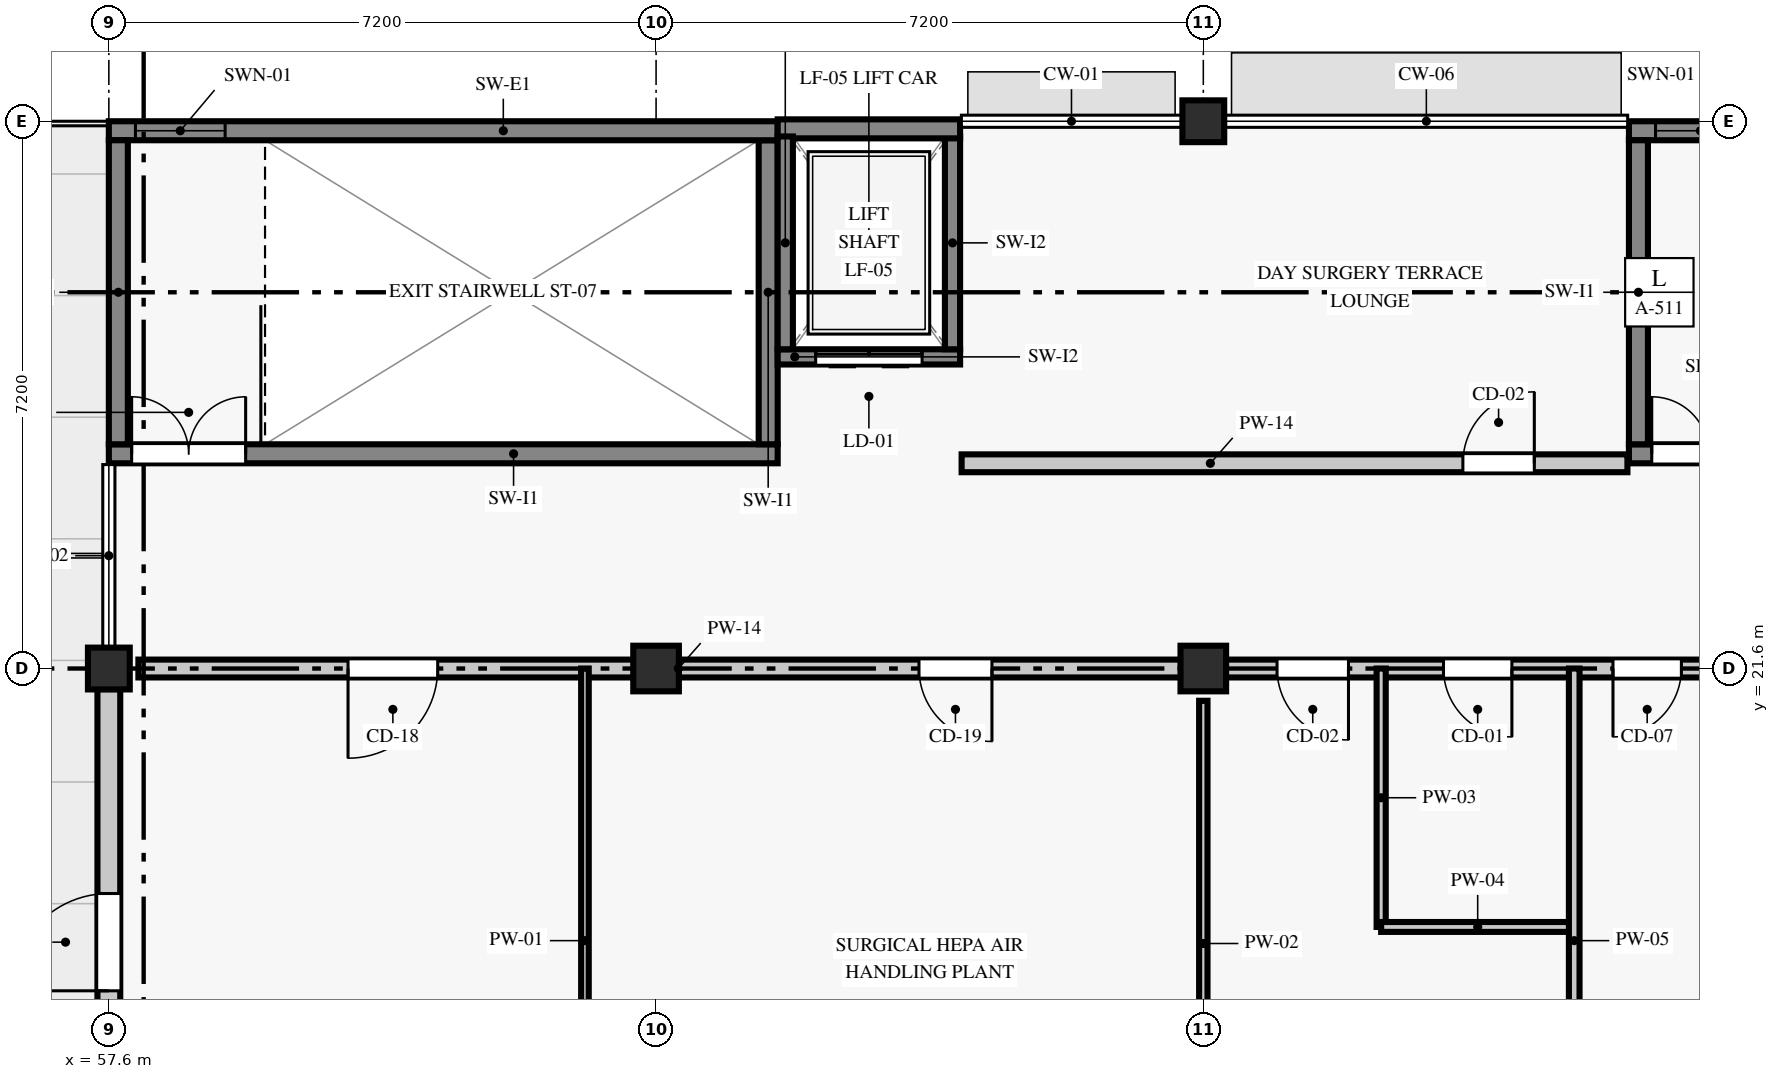
"""IFC4 building model, lengths in metres.
Left out: names, types, materials, properties, quantities, classifications, styles, units other than length and angle.
Written with IfcOpenShell. Run it as: python <this file> out.ifc"""

import sys

from ifc_helpers import new_model, si_unit, direction, frame, frame_2d, origin, origin_2d, place, context, subcontext, project, spatial, rectangle, extrude, element, fill, save


model = new_model("IFC4")
c1 = context("Model", 3, precision=1e-05, world=origin(), true_north=direction((0.0, 1.0)))
c2 = subcontext(c1, "Body", "Model", "MODEL_VIEW")
j1 = project(units=[si_unit("LENGTHUNIT", "METRE"), si_unit("PLANEANGLEUNIT", "RADIAN")], contexts=[c1])
p1 = place(None, origin())
s1 = spatial("IfcSite", under=j1, at=p1, CompositionType="ELEMENT")
p2 = place(p1, origin())
s2 = spatial("IfcBuilding", under=s1, at=p2, CompositionType="ELEMENT")
p3 = place(p2, frame((0.0, 0.0, 13.8)))
s3 = spatial("IfcBuildingStorey", under=s2, at=p3, CompositionType="ELEMENT", Elevation=13.8)
p4 = place(p3, frame((57.6, 21.6, 0.0), z_axis=(0.0, 0.0, 1.0), x_axis=(1.0, 0.0, 0.0)))
e1 = element("IfcColumn", 1, at=p4, inside=s3, PredefinedType="COLUMN", context=c2, shape_type="SweptSolid", body=[
    extrude(rectangle(XDim=0.55, YDim=0.55, at=origin_2d()), origin(), (0.0, 0.0, 1.0), 4.2),
])
for number, where, z_axis, x_axis in (
    (2, (64.8, 21.6, 0.0), (0.0, 0.0, 1.0), (1.0, 0.0, 0.0)),
    (3, (72.0, 21.6, 0.0), (0.0, 0.0, 1.0), (1.0, 0.0, 0.0)),
):
    element("IfcColumn", number, at=place(p3, frame(where, z_axis=z_axis, x_axis=x_axis)), inside=s3, PredefinedType="COLUMN", context=c2, shape_type="SweptSolid", body=[
        extrude(rectangle(XDim=0.6, YDim=0.6, at=origin_2d()), origin(), (0.0, 0.0, 1.0), 4.2),
    ])
p5 = place(p3, frame((72.0, 28.8, 0.0), z_axis=(0.0, 0.0, 1.0), x_axis=(1.0, 0.0, 0.0)))
e4 = element("IfcColumn", 4, at=p5, inside=s3, PredefinedType="COLUMN", context=c2, shape_type="SweptSolid", body=[
    extrude(rectangle(XDim=0.55, YDim=0.55, at=origin_2d()), origin(), (0.0, 0.0, 1.0), 4.2),
])
p6 = place(p3, frame((57.6, 21.329, 0.0), z_axis=(0.0, 0.0, 1.0), x_axis=(0.0, -1.0, 0.0)))
e5 = element("IfcWall", 5, at=p6, inside=s3, PredefinedType="STANDARD", context=c2, shape_type="SweptSolid", body=[
    extrude(rectangle(XDim=6.658, YDim=0.3, at=frame_2d((3.329, 0.0))), origin(), (0.0, 0.0, 1.0), 3.55),
])
p7 = place(p6, frame((2.689, 0.0, 0.0)))
e6 = element("IfcOpeningElement", 6, at=p7, cuts=e5, PredefinedType="OPENING", context=c2, shape_type="SweptSolid", body=[
    extrude(rectangle(XDim=1.28, YDim=2.15, at=frame_2d((0.64, 1.075))), frame((0.0, 0.16, 0.0), z_axis=(0.0, -1.0, 0.0), x_axis=(1.0, 0.0, 0.0)), (0.0, 0.0, 1.0), 0.32),
])
p8 = place(p3, frame((57.6, 24.425, 0.0), z_axis=(0.0, 0.0, 1.0), x_axis=(1.0, 0.0, 0.0)))
e7 = element("IfcWall", 7, at=p8, inside=s3, PredefinedType="SHEAR", context=c2, shape_type="SweptSolid", body=[
    extrude(rectangle(XDim=8.8, YDim=0.25, at=frame_2d((4.4, 0.0))), origin(), (0.0, 0.0, 1.0), 4.2),
])
p9 = place(p8, frame((0.3, 0.0, 0.0)))
e8 = element("IfcOpeningElement", 8, at=p9, cuts=e7, PredefinedType="OPENING", context=c2, shape_type="SweptSolid", body=[
    extrude(rectangle(XDim=1.5, YDim=2.15, at=frame_2d((0.75, 1.075))), frame((0.0, 0.135, 0.0), z_axis=(0.0, -1.0, 0.0), x_axis=(1.0, 0.0, 0.0)), (0.0, 0.0, 1.0), 0.27),
])
p10 = place(p3, frame((66.275, 24.55, 0.0), z_axis=(0.0, 0.0, 1.0), x_axis=(0.0, 1.0, 0.0)))
e9 = element("IfcWall", 9, at=p10, inside=s3, PredefinedType="SHEAR", context=c2, shape_type="SweptSolid", body=[
    extrude(rectangle(XDim=4.0, YDim=0.25, at=frame_2d((2.0, 0.0))), origin(), (0.0, 0.0, 1.0), 4.2),
])
p11 = place(p3, frame((66.4, 28.675, 0.0), z_axis=(0.0, 0.0, 1.0), x_axis=(-1.0, 0.0, 0.0)))
e10 = element("IfcWall", 10, at=p11, inside=s3, PredefinedType="SHEAR", context=c2, shape_type="SweptSolid", body=[
    extrude(rectangle(XDim=8.8, YDim=0.25, at=frame_2d((4.4, 0.0))), origin(), (0.0, 0.0, 1.0), 4.2),
])
p12 = place(p11, frame((7.27, 0.0, 0.92)))
e11 = element("IfcOpeningElement", 11, at=p12, cuts=e10, PredefinedType="OPENING", context=c2, shape_type="SweptSolid", body=[
    extrude(rectangle(XDim=1.18, YDim=1.48, at=frame_2d((0.59, 0.74))), frame((0.0, 0.135, 0.0), z_axis=(0.0, -1.0, 0.0), x_axis=(1.0, 0.0, 0.0)), (0.0, 0.0, 1.0), 0.27),
])
p13 = place(p3, frame((57.725, 28.55, 0.0), z_axis=(0.0, 0.0, 1.0), x_axis=(0.0, -1.0, 0.0)))
e12 = element("IfcWall", 12, at=p13, inside=s3, PredefinedType="SHEAR", context=c2, shape_type="SweptSolid", body=[
    extrude(rectangle(XDim=4.0, YDim=0.25, at=frame_2d((2.0, 0.0))), origin(), (0.0, 0.0, 1.0), 4.2),
])
p14 = place(p3, frame((77.6, 24.425, 0.0), z_axis=(0.0, 0.0, 1.0), x_axis=(1.0, 0.0, 0.0)))
e13 = element("IfcWall", 13, at=p14, inside=s3, PredefinedType="SHEAR", context=c2, shape_type="SweptSolid", body=[
    extrude(rectangle(XDim=8.8, YDim=0.25, at=frame_2d((4.4, 0.0))), origin(), (0.0, 0.0, 1.0), 4.2),
])
p15 = place(p14, frame((0.3, 0.0, 0.0)))
e14 = element("IfcOpeningElement", 14, at=p15, cuts=e13, PredefinedType="OPENING", context=c2, shape_type="SweptSolid", body=[
    extrude(rectangle(XDim=1.5, YDim=2.15, at=frame_2d((0.75, 1.075))), frame((0.0, 0.135, 0.0), z_axis=(0.0, -1.0, 0.0), x_axis=(1.0, 0.0, 0.0)), (0.0, 0.0, 1.0), 0.27),
])
p16 = place(p3, frame((86.4, 28.675, 0.0), z_axis=(0.0, 0.0, 1.0), x_axis=(-1.0, 0.0, 0.0)))
e15 = element("IfcWall", 15, at=p16, inside=s3, PredefinedType="SHEAR", context=c2, shape_type="SweptSolid", body=[
    extrude(rectangle(XDim=8.8, YDim=0.25, at=frame_2d((4.4, 0.0))), origin(), (0.0, 0.0, 1.0), 4.2),
])
p17 = place(p16, frame((7.27, 0.0, 0.92)))
e16 = element("IfcOpeningElement", 16, at=p17, cuts=e15, PredefinedType="OPENING", context=c2, shape_type="SweptSolid", body=[
    extrude(rectangle(XDim=1.18, YDim=1.48, at=frame_2d((0.59, 0.74))), frame((0.0, 0.135, 0.0), z_axis=(0.0, -1.0, 0.0), x_axis=(1.0, 0.0, 0.0)), (0.0, 0.0, 1.0), 0.27),
])
p18 = place(p3, frame((77.725, 28.55, 0.0), z_axis=(0.0, 0.0, 1.0), x_axis=(0.0, -1.0, 0.0)))
e17 = element("IfcWall", 17, at=p18, inside=s3, PredefinedType="SHEAR", context=c2, shape_type="SweptSolid", body=[
    extrude(rectangle(XDim=4.0, YDim=0.25, at=frame_2d((2.0, 0.0))), origin(), (0.0, 0.0, 1.0), 4.2),
])
p19 = place(p3, frame((66.4, 25.7, 0.0), z_axis=(0.0, 0.0, 1.0), x_axis=(1.0, 0.0, 0.0)))
e18 = element("IfcWall", 18, at=p19, inside=s3, PredefinedType="SHEAR", context=c2, shape_type="SweptSolid", body=[
    extrude(rectangle(XDim=2.4, YDim=0.2, at=frame_2d((1.2, 0.0))), origin(), (0.0, 0.0, 1.0), 4.2),
])
p20 = place(p19, frame((0.5, 0.0, 0.0)))
e19 = element("IfcOpeningElement", 19, at=p20, cuts=e18, PredefinedType="OPENING", context=c2, shape_type="SweptSolid", body=[
    extrude(rectangle(XDim=1.4, YDim=2.15, at=frame_2d((0.7, 1.075))), frame((0.0, 0.11, 0.0), z_axis=(0.0, -1.0, 0.0), x_axis=(1.0, 0.0, 0.0)), (0.0, 0.0, 1.0), 0.22),
])
p21 = place(p3, frame((68.7, 25.8, 0.0), z_axis=(0.0, 0.0, 1.0), x_axis=(0.0, 1.0, 0.0)))
e20 = element("IfcWall", 20, at=p21, inside=s3, PredefinedType="SHEAR", context=c2, shape_type="SweptSolid", body=[
    extrude(rectangle(XDim=2.8, YDim=0.2, at=frame_2d((1.4, 0.0))), origin(), (0.0, 0.0, 1.0), 4.2),
])
p22 = place(p3, frame((68.8, 28.7, 0.0), z_axis=(0.0, 0.0, 1.0), x_axis=(-1.0, 0.0, 0.0)))
e21 = element("IfcWall", 21, at=p22, inside=s3, PredefinedType="SHEAR", context=c2, shape_type="SweptSolid", body=[
    extrude(rectangle(XDim=2.4, YDim=0.25, at=frame_2d((1.2, 0.0))), origin(), (0.0, 0.0, 1.0), 4.2),
])
p23 = place(p3, frame((66.5, 28.6, 0.0), z_axis=(0.0, 0.0, 1.0), x_axis=(0.0, -1.0, 0.0)))
e22 = element("IfcWall", 22, at=p23, inside=s3, PredefinedType="SHEAR", context=c2, shape_type="SweptSolid", body=[
    extrude(rectangle(XDim=2.8, YDim=0.2, at=frame_2d((1.4, 0.0))), origin(), (0.0, 0.0, 1.0), 4.2),
])
p24 = place(p3, frame((57.989, 21.6, 0.0), z_axis=(0.0, 0.0, 1.0), x_axis=(1.0, 0.0, 0.0)))
e23 = element("IfcWall", 23, at=p24, inside=s3, PredefinedType="PARTITIONING", context=c2, shape_type="SweptSolid", body=[
    extrude(rectangle(XDim=28.022, YDim=0.235, at=frame_2d((14.011, 0.0))), origin(), (0.0, 0.0, 1.0), 3.35),
])
p25 = place(p24, frame((2.758, 0.0, 0.0)))
e24 = element("IfcOpeningElement", 24, at=p25, cuts=e23, PredefinedType="OPENING", context=c2, shape_type="SweptSolid", body=[
    extrude(rectangle(XDim=1.18, YDim=2.18, at=frame_2d((0.59, 1.09))), frame((0.0, 0.127, 0.0), z_axis=(0.0, -1.0, 0.0), x_axis=(1.0, 0.0, 0.0)), (0.0, 0.0, 1.0), 0.255),
])
p26 = place(p24, frame((10.27, 0.0, 0.0)))
e25 = element("IfcOpeningElement", 25, at=p26, cuts=e23, PredefinedType="OPENING", context=c2, shape_type="SweptSolid", body=[
    extrude(rectangle(XDim=0.96, YDim=2.23, at=frame_2d((0.48, 1.115))), frame((0.0, 0.127, 0.0), z_axis=(0.0, -1.0, 0.0), x_axis=(1.0, 0.0, 0.0)), (0.0, 0.0, 1.0), 0.255),
])
p27 = place(p24, frame((14.981, 0.0, 0.0)))
e26 = element("IfcOpeningElement", 26, at=p27, cuts=e23, PredefinedType="OPENING", context=c2, shape_type="SweptSolid", body=[
    extrude(rectangle(XDim=0.94, YDim=2.08, at=frame_2d((0.47, 1.04))), frame((0.0, 0.127, 0.0), z_axis=(0.0, -1.0, 0.0), x_axis=(1.0, 0.0, 0.0)), (0.0, 0.0, 1.0), 0.255),
])
p28 = place(p24, frame((17.171, 0.0, 0.0)))
e27 = element("IfcOpeningElement", 27, at=p28, cuts=e23, PredefinedType="OPENING", context=c2, shape_type="SweptSolid", body=[
    extrude(rectangle(XDim=0.9, YDim=2.08, at=frame_2d((0.45, 1.04))), frame((0.0, 0.127, 0.0), z_axis=(0.0, -1.0, 0.0), x_axis=(1.0, 0.0, 0.0)), (0.0, 0.0, 1.0), 0.255),
])
p29 = place(p24, frame((19.401, 0.0, 0.0)))
e28 = element("IfcOpeningElement", 28, at=p29, cuts=e23, PredefinedType="OPENING", context=c2, shape_type="SweptSolid", body=[
    extrude(rectangle(XDim=0.9, YDim=2.13, at=frame_2d((0.45, 1.065))), frame((0.0, 0.127, 0.0), z_axis=(0.0, -1.0, 0.0), x_axis=(1.0, 0.0, 0.0)), (0.0, 0.0, 1.0), 0.255),
])
p30 = place(p24, frame((24.318, 0.0, 0.0)))
e29 = element("IfcOpeningElement", 29, at=p30, cuts=e23, PredefinedType="OPENING", context=c2, shape_type="SweptSolid", body=[
    extrude(rectangle(XDim=0.9, YDim=2.08, at=frame_2d((0.45, 1.04))), frame((0.0, 0.127, 0.0), z_axis=(0.0, -1.0, 0.0), x_axis=(1.0, 0.0, 0.0)), (0.0, 0.0, 1.0), 0.255),
])
p31 = place(p3, frame((63.864, 14.44, 0.0), z_axis=(0.0, 0.0, 1.0), x_axis=(0.0, 1.0, 0.0)))
e30 = element("IfcWall", 30, at=p31, inside=s3, PredefinedType="PARTITIONING", context=c2, shape_type="SweptSolid", body=[
    extrude(rectangle(XDim=7.16, YDim=0.1, at=frame_2d((3.58, 0.0))), origin(), (0.0, 0.0, 1.0), 3.35),
])
p32 = place(p3, frame((72.0, 14.789, 0.0), z_axis=(0.0, 0.0, 1.0), x_axis=(0.0, 1.0, 0.0)))
e31 = element("IfcWall", 31, at=p32, inside=s3, PredefinedType="PARTITIONING", context=c2, shape_type="SweptSolid", body=[
    extrude(rectangle(XDim=6.387, YDim=0.11, at=frame_2d((3.193, 0.0))), origin(), (0.0, 0.0, 1.0), 3.6),
])
p33 = place(p3, frame((74.34, 18.2, 0.0), z_axis=(0.0, 0.0, 1.0), x_axis=(0.0, 1.0, 0.0)))
e32 = element("IfcWall", 32, at=p33, inside=s3, PredefinedType="PARTITIONING", context=c2, shape_type="SweptSolid", body=[
    extrude(rectangle(XDim=3.4, YDim=0.12, at=frame_2d((1.7, 0.0))), origin(), (0.0, 0.0, 1.0), 3.35),
])
p34 = place(p3, frame((74.34, 18.2, 0.0), z_axis=(0.0, 0.0, 1.0), x_axis=(1.0, 0.0, 0.0)))
e33 = element("IfcWall", 33, at=p34, inside=s3, PredefinedType="PARTITIONING", context=c2, shape_type="SweptSolid", body=[
    extrude(rectangle(XDim=2.54, YDim=0.13, at=frame_2d((1.27, 0.0))), origin(), (0.0, 0.0, 1.0), 3.7),
])
p35 = place(p3, frame((76.88, 14.44, 0.0), z_axis=(0.0, 0.0, 1.0), x_axis=(0.0, 1.0, 0.0)))
e34 = element("IfcWall", 34, at=p35, inside=s3, PredefinedType="PARTITIONING", context=c2, shape_type="SweptSolid", body=[
    extrude(rectangle(XDim=7.16, YDim=0.14, at=frame_2d((3.58, 0.0))), origin(), (0.0, 0.0, 1.0), 3.35),
])
p36 = place(p3, frame((68.82, 24.3, 0.0), z_axis=(0.0, 0.0, 1.0), x_axis=(1.0, 0.0, 0.0)))
e35 = element("IfcWall", 35, at=p36, inside=s3, PredefinedType="PARTITIONING", context=c2, shape_type="SweptSolid", body=[
    extrude(rectangle(XDim=8.76, YDim=0.235, at=frame_2d((4.38, 0.0))), origin(), (0.0, 0.0, 1.0), 3.6),
])
p37 = place(p36, frame((6.595, 0.0, 0.0)))
e36 = element("IfcOpeningElement", 36, at=p37, cuts=e35, PredefinedType="OPENING", context=c2, shape_type="SweptSolid", body=[
    extrude(rectangle(XDim=0.94, YDim=2.08, at=frame_2d((0.47, 1.04))), frame((0.0, 0.127, 0.0), z_axis=(0.0, -1.0, 0.0), x_axis=(1.0, 0.0, 0.0)), (0.0, 0.0, 1.0), 0.255),
])
p38 = place(p7, frame((1.28, 0.0, 0.0), z_axis=(0.0, 0.0, 1.0), x_axis=(-1.0, 0.0, 0.0)))
e37 = element("IfcDoor", 37, at=p38, inside=s3, OperationType="SINGLE_SWING_LEFT", PredefinedType="DOOR", context=c2, shape_type="SweptSolid", body=[
    extrude(rectangle(XDim=1.28, YDim=2.15, at=frame_2d((0.64, 1.075))), frame((0.0, 0.025, 0.0), z_axis=(0.0, -1.0, 0.0), x_axis=(1.0, 0.0, 0.0)), (0.0, 0.0, 1.0), 0.05),
])
fill(e6, e37)
p39 = place(p9, origin())
e38 = element("IfcDoor", 38, at=p39, inside=s3, OperationType="DOUBLE_DOOR_SINGLE_SWING", PredefinedType="DOOR", context=c2, shape_type="SweptSolid", body=[
    extrude(rectangle(XDim=1.5, YDim=2.15, at=frame_2d((0.75, 1.075))), frame((0.0, 0.025, 0.0), z_axis=(0.0, -1.0, 0.0), x_axis=(1.0, 0.0, 0.0)), (0.0, 0.0, 1.0), 0.05),
])
fill(e8, e38)
p40 = place(p12, origin())
e39 = element("IfcWindow", 39, at=p40, inside=s3, PartitioningType="SINGLE_PANEL", PredefinedType="WINDOW", context=c2, shape_type="SweptSolid", body=[
    extrude(rectangle(XDim=1.18, YDim=1.48, at=frame_2d((0.59, 0.74))), frame((0.0, 0.03, 0.0), z_axis=(0.0, -1.0, 0.0), x_axis=(1.0, 0.0, 0.0)), (0.0, 0.0, 1.0), 0.06),
])
fill(e11, e39)
p41 = place(p15, origin())
e40 = element("IfcDoor", 40, at=p41, inside=s3, OperationType="DOUBLE_DOOR_SINGLE_SWING", PredefinedType="DOOR", context=c2, shape_type="SweptSolid", body=[
    extrude(rectangle(XDim=1.5, YDim=2.15, at=frame_2d((0.75, 1.075))), frame((0.0, 0.025, 0.0), z_axis=(0.0, -1.0, 0.0), x_axis=(1.0, 0.0, 0.0)), (0.0, 0.0, 1.0), 0.05),
])
fill(e14, e40)
p42 = place(p17, origin())
e41 = element("IfcWindow", 41, at=p42, inside=s3, PartitioningType="SINGLE_PANEL", PredefinedType="WINDOW", context=c2, shape_type="SweptSolid", body=[
    extrude(rectangle(XDim=1.18, YDim=1.48, at=frame_2d((0.59, 0.74))), frame((0.0, 0.03, 0.0), z_axis=(0.0, -1.0, 0.0), x_axis=(1.0, 0.0, 0.0)), (0.0, 0.0, 1.0), 0.06),
])
fill(e16, e41)
p43 = place(p20, frame((1.4, 0.0, 0.0), z_axis=(0.0, 0.0, 1.0), x_axis=(-1.0, 0.0, 0.0)))
e42 = element("IfcDoor", 42, at=p43, inside=s3, OperationType="DOUBLE_DOOR_SLIDING", PredefinedType="DOOR", context=c2, shape_type="SweptSolid", body=[
    extrude(rectangle(XDim=1.4, YDim=2.15, at=frame_2d((0.7, 1.075))), frame((0.0, 0.025, 0.0), z_axis=(0.0, -1.0, 0.0), x_axis=(1.0, 0.0, 0.0)), (0.0, 0.0, 1.0), 0.05),
])
fill(e19, e42)
p44 = place(p25, frame((1.18, 0.0, 0.0), z_axis=(0.0, 0.0, 1.0), x_axis=(-1.0, 0.0, 0.0)))
e43 = element("IfcDoor", 43, at=p44, inside=s3, OperationType="SINGLE_SWING_RIGHT", PredefinedType="DOOR", context=c2, shape_type="SweptSolid", body=[
    extrude(rectangle(XDim=1.18, YDim=2.18, at=frame_2d((0.59, 1.09))), frame((0.0, 0.025, 0.0), z_axis=(0.0, -1.0, 0.0), x_axis=(1.0, 0.0, 0.0)), (0.0, 0.0, 1.0), 0.05),
])
fill(e24, e43)
p45 = place(p26, frame((0.96, 0.0, 0.0), z_axis=(0.0, 0.0, 1.0), x_axis=(-1.0, 0.0, 0.0)))
e44 = element("IfcDoor", 44, at=p45, inside=s3, OperationType="SINGLE_SWING_LEFT", PredefinedType="DOOR", context=c2, shape_type="SweptSolid", body=[
    extrude(rectangle(XDim=0.96, YDim=2.23, at=frame_2d((0.48, 1.115))), frame((0.0, 0.025, 0.0), z_axis=(0.0, -1.0, 0.0), x_axis=(1.0, 0.0, 0.0)), (0.0, 0.0, 1.0), 0.05),
])
fill(e25, e44)
p46 = place(p27, frame((0.94, 0.0, 0.0), z_axis=(0.0, 0.0, 1.0), x_axis=(-1.0, 0.0, 0.0)))
e45 = element("IfcDoor", 45, at=p46, inside=s3, OperationType="SINGLE_SWING_LEFT", PredefinedType="DOOR", context=c2, shape_type="SweptSolid", body=[
    extrude(rectangle(XDim=0.94, YDim=2.08, at=frame_2d((0.47, 1.04))), frame((0.0, 0.025, 0.0), z_axis=(0.0, -1.0, 0.0), x_axis=(1.0, 0.0, 0.0)), (0.0, 0.0, 1.0), 0.05),
])
fill(e26, e45)
p47 = place(p28, frame((0.9, 0.0, 0.0), z_axis=(0.0, 0.0, 1.0), x_axis=(-1.0, 0.0, 0.0)))
e46 = element("IfcDoor", 46, at=p47, inside=s3, OperationType="SINGLE_SWING_LEFT", PredefinedType="DOOR", context=c2, shape_type="SweptSolid", body=[
    extrude(rectangle(XDim=0.9, YDim=2.08, at=frame_2d((0.45, 1.04))), frame((0.0, 0.025, 0.0), z_axis=(0.0, -1.0, 0.0), x_axis=(1.0, 0.0, 0.0)), (0.0, 0.0, 1.0), 0.05),
])
fill(e27, e46)
p48 = place(p29, frame((0.9, 0.0, 0.0), z_axis=(0.0, 0.0, 1.0), x_axis=(-1.0, 0.0, 0.0)))
e47 = element("IfcDoor", 47, at=p48, inside=s3, OperationType="SINGLE_SWING_RIGHT", PredefinedType="DOOR", context=c2, shape_type="SweptSolid", body=[
    extrude(rectangle(XDim=0.9, YDim=2.13, at=frame_2d((0.45, 1.065))), frame((0.0, 0.025, 0.0), z_axis=(0.0, -1.0, 0.0), x_axis=(1.0, 0.0, 0.0)), (0.0, 0.0, 1.0), 0.05),
])
fill(e28, e47)
p49 = place(p37, origin())
e48 = element("IfcDoor", 48, at=p49, inside=s3, OperationType="SINGLE_SWING_RIGHT", PredefinedType="DOOR", context=c2, shape_type="SweptSolid", body=[
    extrude(rectangle(XDim=0.94, YDim=2.08, at=frame_2d((0.47, 1.04))), frame((0.0, 0.025, 0.0), z_axis=(0.0, -1.0, 0.0), x_axis=(1.0, 0.0, 0.0)), (0.0, 0.0, 1.0), 0.05),
])
fill(e36, e48)
save(model, sys.argv[1])
